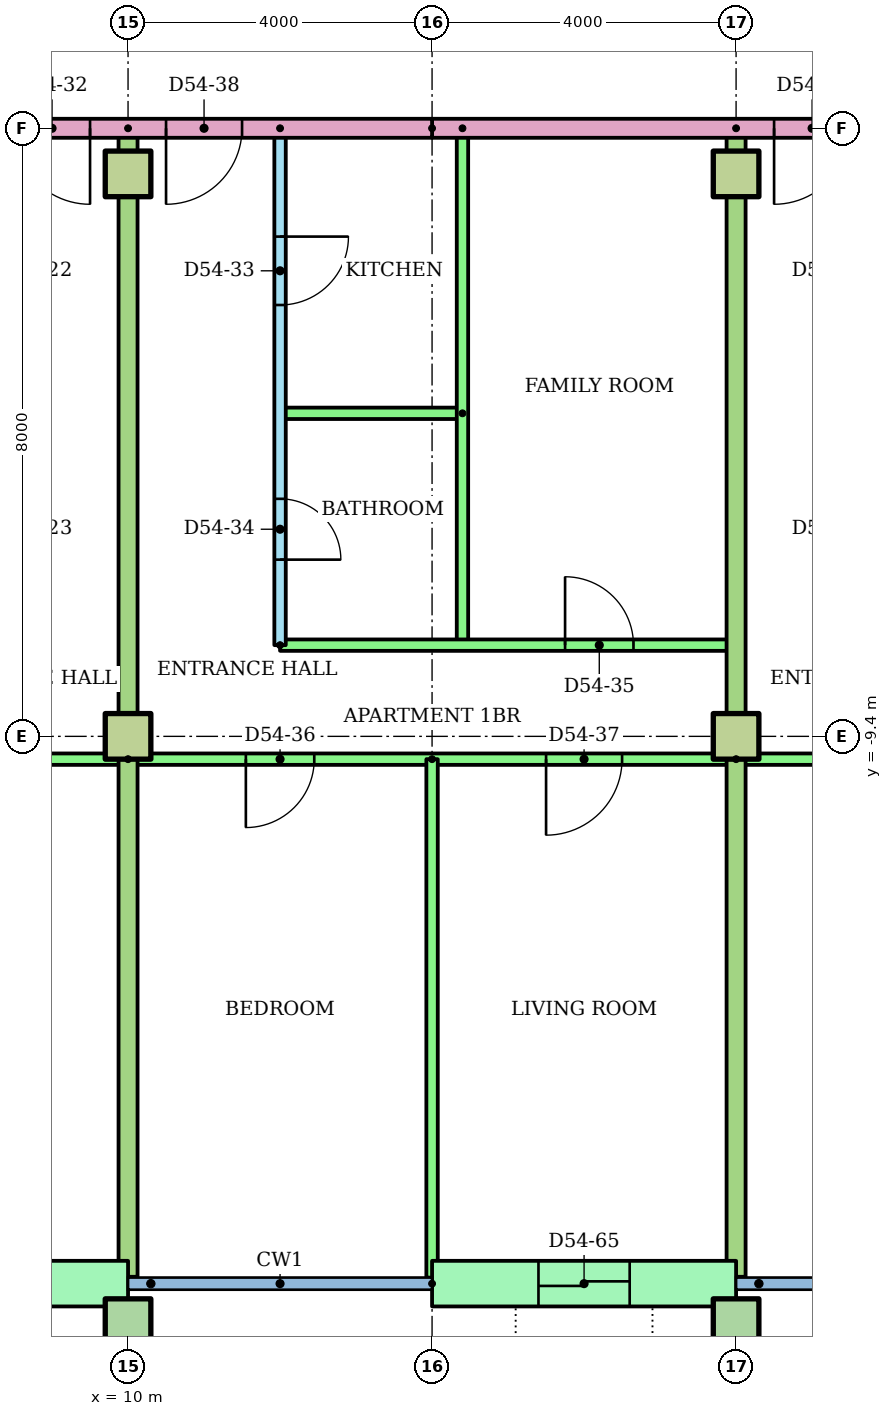
"""IFC4 building model, lengths in metres.
Left out: names, types, materials, properties, quantities, classifications, styles, units other than length and angle.
Written with IfcOpenShell. Run it as: python <this file> out.ifc"""

import sys

from ifc_helpers import new_model, si_unit, direction, frame, frame_2d, origin, origin_2d, place, context, subcontext, project, spatial, rectangle, hollow_rectangle, extrude, element, fill, save


model = new_model("IFC4")
c1 = context("Model", 3, precision=1e-05, world=origin(), true_north=direction((0.0, 1.0)))
c2 = subcontext(c1, "Body", "Model", "MODEL_VIEW")
j1 = project(units=[si_unit("LENGTHUNIT", "METRE"), si_unit("PLANEANGLEUNIT", "RADIAN")], contexts=[c1])
p1 = place(None, origin())
s1 = spatial("IfcSite", under=j1, at=p1, CompositionType="ELEMENT")
p2 = place(p1, origin())
s2 = spatial("IfcBuilding", under=s1, at=p2, CompositionType="ELEMENT")
p3 = place(p2, frame((0.0, 0.0, 210.8)))
s3 = spatial("IfcBuildingStorey", under=s2, at=p3, CompositionType="ELEMENT", Elevation=210.8)
for number, where in (
    (1, (10.0, -17.1, 0.0)),
    (2, (18.0, -17.1, 0.0)),
):
    element("IfcColumn", number, at=place(p3, frame(where)), inside=s3, PredefinedType="COLUMN", context=c2, shape_type="SweptSolid", body=[
        extrude(hollow_rectangle(XDim=0.6, YDim=0.6, WallThickness=0.03, at=origin_2d()), origin(), (0.0, 0.0, 1.0), 3.2),
    ])
for number, where in (
    (3, (10.0, -9.4, 0.0)),
    (4, (18.0, -9.4, 0.0)),
    (5, (10.0, -2.0, 0.0)),
    (6, (18.0, -2.0, 0.0)),
):
    element("IfcColumn", number, at=place(p3, frame(where)), inside=s3, PredefinedType="COLUMN", context=c2, shape_type="SweptSolid", body=[
        extrude(rectangle(XDim=0.6, YDim=0.6, at=origin_2d()), origin(), (0.0, 0.0, 1.0), 3.2),
    ])
p4 = place(p3, frame((6.0, -16.6, 0.0)))
e7 = element("IfcWall", 7, at=p4, inside=s3, PredefinedType="STANDARD", context=c2, shape_type="SweptSolid", body=[
    extrude(rectangle(XDim=4.0, YDim=0.6, at=frame_2d((2.0, 0.0))), origin(), (0.0, 0.0, 1.0), 2.92),
])
p5 = place(p4, frame((1.4, 0.0, 0.0)))
e8 = element("IfcOpeningElement", 8, at=p5, cuts=e7, PredefinedType="OPENING", context=c2, shape_type="SweptSolid", body=[
    extrude(rectangle(XDim=1.2, YDim=2.1, at=frame_2d((0.6, 1.05))), frame((0.0, 0.31, 0.0), z_axis=(0.0, -1.0, 0.0), x_axis=(1.0, 0.0, 0.0)), (0.0, 0.0, 1.0), 0.62),
])
p6 = place(p3, frame((14.0, -16.6, 0.0)))
e9 = element("IfcWall", 9, at=p6, inside=s3, PredefinedType="STANDARD", context=c2, shape_type="SweptSolid", body=[
    extrude(rectangle(XDim=4.0, YDim=0.6, at=frame_2d((2.0, 0.0))), origin(), (0.0, 0.0, 1.0), 2.92),
])
p7 = place(p6, frame((1.4, 0.0, 0.0)))
e10 = element("IfcOpeningElement", 10, at=p7, cuts=e9, PredefinedType="OPENING", context=c2, shape_type="SweptSolid", body=[
    extrude(rectangle(XDim=1.2, YDim=2.1, at=frame_2d((0.6, 1.05))), frame((0.0, 0.31, 0.0), z_axis=(0.0, -1.0, 0.0), x_axis=(1.0, 0.0, 0.0)), (0.0, 0.0, 1.0), 0.62),
])
p8 = place(p3, frame((10.0, -9.7, 0.0), z_axis=(0.0, 0.0, 1.0), x_axis=(-1.0, 0.0, 0.0)))
e11 = element("IfcWall", 11, at=p8, inside=s3, PredefinedType="PARTITIONING", context=c2, shape_type="SweptSolid", body=[
    extrude(rectangle(XDim=24.0, YDim=0.15, at=frame_2d((12.0, 0.0))), origin(), (0.0, 0.0, 1.0), 2.4),
])
p9 = place(p8, frame((21.55, 0.0, 0.0)))
e12 = element("IfcOpeningElement", 12, at=p9, cuts=e11, PredefinedType="OPENING", context=c2, shape_type="SweptSolid", body=[
    extrude(rectangle(XDim=0.9, YDim=2.1, at=frame_2d((0.45, 1.05))), frame((0.0, 0.085, 0.0), z_axis=(0.0, -1.0, 0.0), x_axis=(1.0, 0.0, 0.0)), (0.0, 0.0, 1.0), 0.17),
])
p10 = place(p8, frame((17.55, 0.0, 0.0)))
e13 = element("IfcOpeningElement", 13, at=p10, cuts=e11, PredefinedType="OPENING", context=c2, shape_type="SweptSolid", body=[
    extrude(rectangle(XDim=0.9, YDim=2.1, at=frame_2d((0.45, 1.05))), frame((0.0, 0.085, 0.0), z_axis=(0.0, -1.0, 0.0), x_axis=(1.0, 0.0, 0.0)), (0.0, 0.0, 1.0), 0.17),
])
p11 = place(p8, frame((11.5, 0.0, 0.0)))
e14 = element("IfcOpeningElement", 14, at=p11, cuts=e11, PredefinedType="OPENING", context=c2, shape_type="SweptSolid", body=[
    extrude(rectangle(XDim=1.0, YDim=2.1, at=frame_2d((0.5, 1.05))), frame((0.0, 0.085, 0.0), z_axis=(0.0, -1.0, 0.0), x_axis=(1.0, 0.0, 0.0)), (0.0, 0.0, 1.0), 0.17),
])
p12 = place(p8, frame((5.55, 0.0, 0.0)))
e15 = element("IfcOpeningElement", 15, at=p12, cuts=e11, PredefinedType="OPENING", context=c2, shape_type="SweptSolid", body=[
    extrude(rectangle(XDim=0.9, YDim=2.1, at=frame_2d((0.45, 1.05))), frame((0.0, 0.085, 0.0), z_axis=(0.0, -1.0, 0.0), x_axis=(1.0, 0.0, 0.0)), (0.0, 0.0, 1.0), 0.17),
])
p13 = place(p8, frame((1.55, 0.0, 0.0)))
e16 = element("IfcOpeningElement", 16, at=p13, cuts=e11, PredefinedType="OPENING", context=c2, shape_type="SweptSolid", body=[
    extrude(rectangle(XDim=0.9, YDim=2.1, at=frame_2d((0.45, 1.05))), frame((0.0, 0.085, 0.0), z_axis=(0.0, -1.0, 0.0), x_axis=(1.0, 0.0, 0.0)), (0.0, 0.0, 1.0), 0.17),
])
p14 = place(p3, frame((12.0, -1.4, 0.0), z_axis=(0.0, 0.0, 1.0), x_axis=(0.0, -1.0, 0.0)))
e17 = element("IfcWall", 17, at=p14, inside=s3, PredefinedType="PARTITIONING", context=c2, shape_type="SweptSolid", body=[
    extrude(rectangle(XDim=6.8, YDim=0.15, at=frame_2d((3.4, 0.0))), origin(), (0.0, 0.0, 1.0), 2.4),
])
p15 = place(p14, frame((1.425, 0.0, 0.0)))
e18 = element("IfcOpeningElement", 18, at=p15, cuts=e17, PredefinedType="OPENING", context=c2, shape_type="SweptSolid", body=[
    extrude(rectangle(XDim=0.9, YDim=2.1, at=frame_2d((0.45, 1.05))), frame((0.0, 0.085, 0.0), z_axis=(0.0, -1.0, 0.0), x_axis=(1.0, 0.0, 0.0)), (0.0, 0.0, 1.0), 0.17),
])
p16 = place(p14, frame((4.875, 0.0, 0.0)))
e19 = element("IfcOpeningElement", 19, at=p16, cuts=e17, PredefinedType="OPENING", context=c2, shape_type="SweptSolid", body=[
    extrude(rectangle(XDim=0.8, YDim=2.1, at=frame_2d((0.4, 1.05))), frame((0.0, 0.085, 0.0), z_axis=(0.0, -1.0, 0.0), x_axis=(1.0, 0.0, 0.0)), (0.0, 0.0, 1.0), 0.17),
])
p17 = place(p3, frame((14.4, -5.15, 0.0), z_axis=(0.0, 0.0, 1.0), x_axis=(-1.0, 0.0, 0.0)))
e20 = element("IfcWall", 20, at=p17, inside=s3, PredefinedType="PARTITIONING", context=c2, shape_type="SweptSolid", body=[
    extrude(rectangle(XDim=2.4, YDim=0.15, at=frame_2d((1.2, 0.0))), origin(), (0.0, 0.0, 1.0), 2.4),
])
p18 = place(p3, frame((14.4, -1.4, 0.0), z_axis=(0.0, 0.0, 1.0), x_axis=(0.0, -1.0, 0.0)))
e21 = element("IfcWall", 21, at=p18, inside=s3, PredefinedType="PARTITIONING", context=c2, shape_type="SweptSolid", body=[
    extrude(rectangle(XDim=6.8, YDim=0.15, at=frame_2d((3.4, 0.0))), origin(), (0.0, 0.0, 1.0), 2.4),
])
p19 = place(p3, frame((12.0, -8.2, 0.0)))
e22 = element("IfcWall", 22, at=p19, inside=s3, PredefinedType="PARTITIONING", context=c2, shape_type="SweptSolid", body=[
    extrude(rectangle(XDim=6.0, YDim=0.15, at=frame_2d((3.0, 0.0))), origin(), (0.0, 0.0, 1.0), 2.4),
])
p20 = place(p19, frame((3.75, 0.0, 0.0)))
e23 = element("IfcOpeningElement", 23, at=p20, cuts=e22, PredefinedType="OPENING", context=c2, shape_type="SweptSolid", body=[
    extrude(rectangle(XDim=0.9, YDim=2.1, at=frame_2d((0.45, 1.05))), frame((0.0, 0.085, 0.0), z_axis=(0.0, -1.0, 0.0), x_axis=(1.0, 0.0, 0.0)), (0.0, 0.0, 1.0), 0.17),
])
p21 = place(p3, frame((18.0, -9.7, 0.0), z_axis=(0.0, 0.0, 1.0), x_axis=(-1.0, 0.0, 0.0)))
e24 = element("IfcWall", 24, at=p21, inside=s3, PredefinedType="PARTITIONING", context=c2, shape_type="SweptSolid", body=[
    extrude(rectangle(XDim=8.0, YDim=0.15, at=frame_2d((4.0, 0.0))), origin(), (0.0, 0.0, 1.0), 2.4),
])
p22 = place(p21, frame((5.55, 0.0, 0.0)))
e25 = element("IfcOpeningElement", 25, at=p22, cuts=e24, PredefinedType="OPENING", context=c2, shape_type="SweptSolid", body=[
    extrude(rectangle(XDim=0.9, YDim=2.1, at=frame_2d((0.45, 1.05))), frame((0.0, 0.085, 0.0), z_axis=(0.0, -1.0, 0.0), x_axis=(1.0, 0.0, 0.0)), (0.0, 0.0, 1.0), 0.17),
])
p23 = place(p21, frame((1.5, 0.0, 0.0)))
e26 = element("IfcOpeningElement", 26, at=p23, cuts=e24, PredefinedType="OPENING", context=c2, shape_type="SweptSolid", body=[
    extrude(rectangle(XDim=1.0, YDim=2.1, at=frame_2d((0.5, 1.05))), frame((0.0, 0.085, 0.0), z_axis=(0.0, -1.0, 0.0), x_axis=(1.0, 0.0, 0.0)), (0.0, 0.0, 1.0), 0.17),
])
p24 = place(p3, frame((14.0, -9.7, 0.0), z_axis=(0.0, 0.0, 1.0), x_axis=(0.0, -1.0, 0.0)))
e27 = element("IfcWall", 27, at=p24, inside=s3, PredefinedType="PARTITIONING", context=c2, shape_type="SweptSolid", body=[
    extrude(rectangle(XDim=6.821, YDim=0.15, at=frame_2d((3.411, 0.0))), origin(), (0.0, 0.0, 1.0), 2.4),
])
p25 = place(p3, frame((10.0, -1.4, 0.0), z_axis=(0.0, 0.0, 1.0), x_axis=(0.0, -1.0, 0.0)))
e28 = element("IfcWall", 28, at=p25, inside=s3, PredefinedType="PARTITIONING", context=c2, shape_type="SweptSolid", body=[
    extrude(rectangle(XDim=15.11, YDim=0.25, at=frame_2d((7.555, 0.0))), origin(), (0.0, 0.0, 1.0), 2.4),
])
p26 = place(p3, frame((28.92, -9.7, 0.0), z_axis=(0.0, 0.0, 1.0), x_axis=(-1.0, 0.0, 0.0)))
e29 = element("IfcWall", 29, at=p26, inside=s3, PredefinedType="PARTITIONING", context=c2, shape_type="SweptSolid", body=[
    extrude(rectangle(XDim=10.92, YDim=0.15, at=frame_2d((5.46, 0.0))), origin(), (0.0, 0.0, 1.0), 2.4),
])
p27 = place(p26, frame((7.32, 0.0, 0.0)))
e30 = element("IfcOpeningElement", 30, at=p27, cuts=e29, PredefinedType="OPENING", context=c2, shape_type="SweptSolid", body=[
    extrude(rectangle(XDim=1.0, YDim=2.1, at=frame_2d((0.5, 1.05))), frame((0.0, 0.085, 0.0), z_axis=(0.0, -1.0, 0.0), x_axis=(1.0, 0.0, 0.0)), (0.0, 0.0, 1.0), 0.17),
])
p28 = place(p26, frame((1.544, 0.0, 0.0)))
e31 = element("IfcOpeningElement", 31, at=p28, cuts=e29, PredefinedType="OPENING", context=c2, shape_type="SweptSolid", body=[
    extrude(rectangle(XDim=0.9, YDim=2.1, at=frame_2d((0.45, 1.05))), frame((0.0, 0.085, 0.0), z_axis=(0.0, -1.0, 0.0), x_axis=(1.0, 0.0, 0.0)), (0.0, 0.0, 1.0), 0.17),
])
p29 = place(p3, frame((18.0, -1.4, 0.0), z_axis=(0.0, 0.0, 1.0), x_axis=(0.0, -1.0, 0.0)))
e32 = element("IfcWall", 32, at=p29, inside=s3, PredefinedType="PARTITIONING", context=c2, shape_type="SweptSolid", body=[
    extrude(rectangle(XDim=15.11, YDim=0.25, at=frame_2d((7.555, 0.0))), origin(), (0.0, 0.0, 1.0), 2.4),
])
p30 = place(p3, frame((28.92, -1.4, 0.0), z_axis=(0.0, 0.0, 1.0), x_axis=(-1.0, 0.0, 0.0)))
e33 = element("IfcWall", 33, at=p30, inside=s3, PredefinedType="PARTITIONING", context=c2, shape_type="SweptSolid", body=[
    extrude(rectangle(XDim=14.92, YDim=0.25, at=frame_2d((7.46, 0.0))), origin(), (0.0, 0.0, 1.0), 2.4),
])
p31 = place(p30, frame((9.42, 0.0, 0.0)))
e34 = element("IfcOpeningElement", 34, at=p31, cuts=e33, PredefinedType="OPENING", context=c2, shape_type="SweptSolid", body=[
    extrude(rectangle(XDim=1.0, YDim=2.1, at=frame_2d((0.5, 1.05))), frame((0.0, 0.135, 0.0), z_axis=(0.0, -1.0, 0.0), x_axis=(1.0, 0.0, 0.0)), (0.0, 0.0, 1.0), 0.27),
])
p32 = place(p3, frame((14.0, -1.4, 0.0), z_axis=(0.0, 0.0, 1.0), x_axis=(-1.0, 0.0, 0.0)))
e35 = element("IfcWall", 35, at=p32, inside=s3, PredefinedType="PARTITIONING", context=c2, shape_type="SweptSolid", body=[
    extrude(rectangle(XDim=28.0, YDim=0.25, at=frame_2d((14.0, 0.0))), origin(), (0.0, 0.0, 1.0), 2.4),
])
p33 = place(p32, frame((4.5, 0.0, 0.0)))
e36 = element("IfcOpeningElement", 36, at=p33, cuts=e35, PredefinedType="OPENING", context=c2, shape_type="SweptSolid", body=[
    extrude(rectangle(XDim=1.0, YDim=2.1, at=frame_2d((0.5, 1.05))), frame((0.0, 0.135, 0.0), z_axis=(0.0, -1.0, 0.0), x_axis=(1.0, 0.0, 0.0)), (0.0, 0.0, 1.0), 0.27),
])
p34 = place(p32, frame((2.5, 0.0, 0.0)))
e37 = element("IfcOpeningElement", 37, at=p34, cuts=e35, PredefinedType="OPENING", context=c2, shape_type="SweptSolid", body=[
    extrude(rectangle(XDim=1.0, YDim=2.1, at=frame_2d((0.5, 1.05))), frame((0.0, 0.135, 0.0), z_axis=(0.0, -1.0, 0.0), x_axis=(1.0, 0.0, 0.0)), (0.0, 0.0, 1.0), 0.27),
])
p35 = place(p33, origin())
e38 = element("IfcDoor", 38, at=p35, inside=s3, OperationType="SINGLE_SWING_LEFT", PredefinedType="DOOR", context=c2, shape_type="SweptSolid", body=[
    extrude(rectangle(XDim=1.0, YDim=2.1, at=frame_2d((0.5, 1.05))), frame((0.0, 0.025, 0.0), z_axis=(0.0, -1.0, 0.0), x_axis=(1.0, 0.0, 0.0)), (0.0, 0.0, 1.0), 0.05),
])
fill(e36, e38)
p36 = place(p15, origin())
e39 = element("IfcDoor", 39, at=p36, inside=s3, OperationType="SINGLE_SWING_LEFT", PredefinedType="DOOR", context=c2, shape_type="SweptSolid", body=[
    extrude(rectangle(XDim=0.9, YDim=2.1, at=frame_2d((0.45, 1.05))), frame((0.0, 0.025, 0.0), z_axis=(0.0, -1.0, 0.0), x_axis=(1.0, 0.0, 0.0)), (0.0, 0.0, 1.0), 0.05),
])
fill(e18, e39)
p37 = place(p16, origin())
e40 = element("IfcDoor", 40, at=p37, inside=s3, OperationType="SINGLE_SWING_RIGHT", PredefinedType="DOOR", context=c2, shape_type="SweptSolid", body=[
    extrude(rectangle(XDim=0.8, YDim=2.1, at=frame_2d((0.4, 1.05))), frame((0.0, 0.025, 0.0), z_axis=(0.0, -1.0, 0.0), x_axis=(1.0, 0.0, 0.0)), (0.0, 0.0, 1.0), 0.05),
])
fill(e19, e40)
p38 = place(p20, origin())
e41 = element("IfcDoor", 41, at=p38, inside=s3, OperationType="SINGLE_SWING_LEFT", PredefinedType="DOOR", context=c2, shape_type="SweptSolid", body=[
    extrude(rectangle(XDim=0.9, YDim=2.1, at=frame_2d((0.45, 1.05))), frame((0.0, 0.025, 0.0), z_axis=(0.0, -1.0, 0.0), x_axis=(1.0, 0.0, 0.0)), (0.0, 0.0, 1.0), 0.05),
])
fill(e23, e41)
p39 = place(p22, origin())
e42 = element("IfcDoor", 42, at=p39, inside=s3, OperationType="SINGLE_SWING_RIGHT", PredefinedType="DOOR", context=c2, shape_type="SweptSolid", body=[
    extrude(rectangle(XDim=0.9, YDim=2.1, at=frame_2d((0.45, 1.05))), frame((0.0, 0.025, 0.0), z_axis=(0.0, -1.0, 0.0), x_axis=(1.0, 0.0, 0.0)), (0.0, 0.0, 1.0), 0.05),
])
fill(e25, e42)
p40 = place(p23, origin())
e43 = element("IfcDoor", 43, at=p40, inside=s3, OperationType="SINGLE_SWING_RIGHT", PredefinedType="DOOR", context=c2, shape_type="SweptSolid", body=[
    extrude(rectangle(XDim=1.0, YDim=2.1, at=frame_2d((0.5, 1.05))), frame((0.0, 0.025, 0.0), z_axis=(0.0, -1.0, 0.0), x_axis=(1.0, 0.0, 0.0)), (0.0, 0.0, 1.0), 0.05),
])
fill(e26, e43)
p41 = place(p34, origin())
e44 = element("IfcDoor", 44, at=p41, inside=s3, OperationType="SINGLE_SWING_RIGHT", PredefinedType="DOOR", context=c2, shape_type="SweptSolid", body=[
    extrude(rectangle(XDim=1.0, YDim=2.1, at=frame_2d((0.5, 1.05))), frame((0.0, 0.025, 0.0), z_axis=(0.0, -1.0, 0.0), x_axis=(1.0, 0.0, 0.0)), (0.0, 0.0, 1.0), 0.05),
])
fill(e37, e44)
p42 = place(p31, origin())
e45 = element("IfcDoor", 45, at=p42, inside=s3, OperationType="SINGLE_SWING_RIGHT", PredefinedType="DOOR", context=c2, shape_type="SweptSolid", body=[
    extrude(rectangle(XDim=1.0, YDim=2.1, at=frame_2d((0.5, 1.05))), frame((0.0, 0.025, 0.0), z_axis=(0.0, -1.0, 0.0), x_axis=(1.0, 0.0, 0.0)), (0.0, 0.0, 1.0), 0.05),
])
fill(e34, e45)
p43 = place(p7, origin())
e46 = element("IfcDoor", 46, at=p43, inside=s3, OperationType="SLIDING_TO_LEFT", PredefinedType="DOOR", context=c2, shape_type="SweptSolid", body=[
    extrude(rectangle(XDim=1.2, YDim=2.1, at=frame_2d((0.6, 1.05))), frame((0.0, 0.025, 0.0), z_axis=(0.0, -1.0, 0.0), x_axis=(1.0, 0.0, 0.0)), (0.0, 0.0, 1.0), 0.05),
])
fill(e10, e46)
save(model, sys.argv[1])
